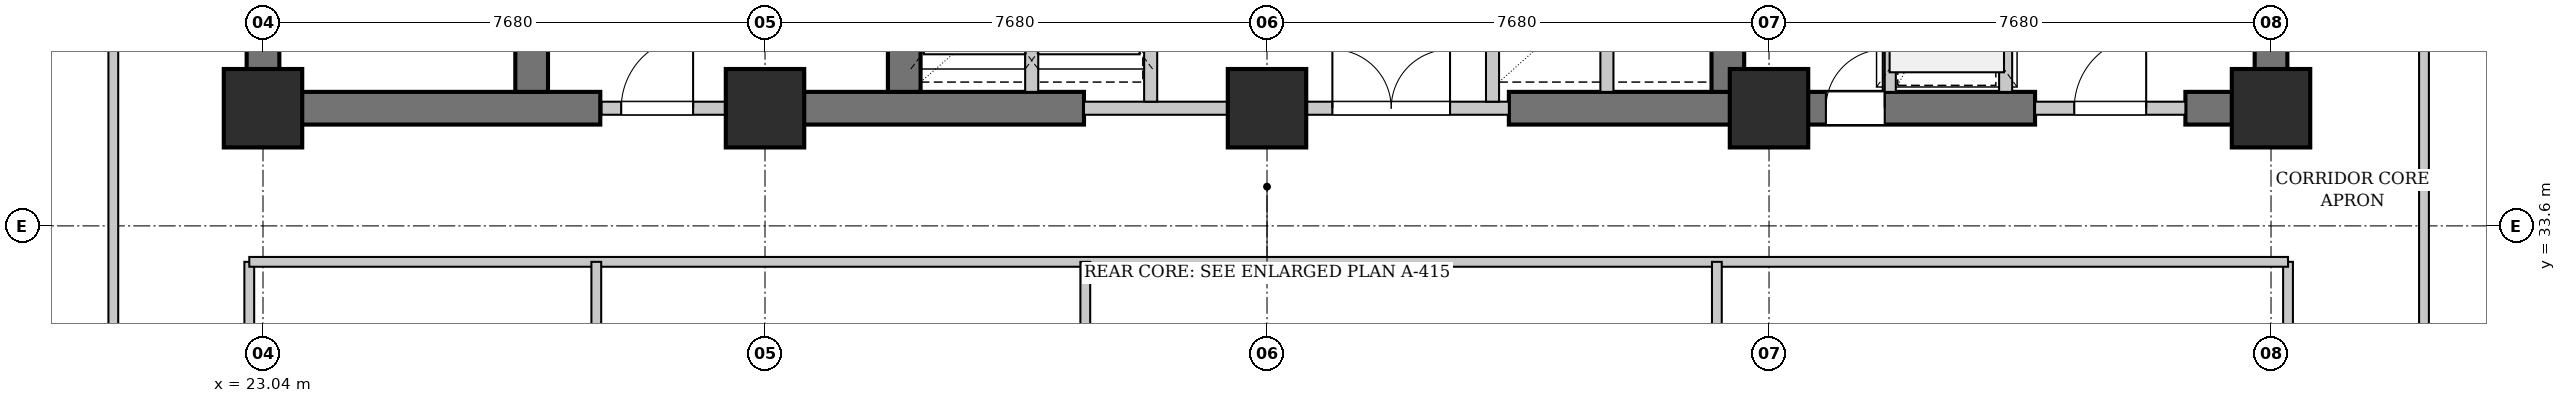
"""IFC4 building model, lengths in metres.
Left out: names, types, materials, properties, quantities, classifications, styles, units other than length and angle.
Written with IfcOpenShell. Run it as: python <this file> out.ifc"""

import sys

from ifc_helpers import new_model, si_unit, direction, frame, frame_2d, origin, origin_2d, place, context, subcontext, project, spatial, rectangle, extrude, element, fill, save


model = new_model("IFC4")
c1 = context("Model", 3, precision=1e-05, world=origin(), true_north=direction((0.0, 1.0)))
c2 = subcontext(c1, "Body", "Model", "MODEL_VIEW")
j1 = project(units=[si_unit("LENGTHUNIT", "METRE"), si_unit("PLANEANGLEUNIT", "RADIAN")], contexts=[c1])
p1 = place(None, origin())
s1 = spatial("IfcSite", under=j1, at=p1, CompositionType="ELEMENT")
p2 = place(p1, origin())
s2 = spatial("IfcBuilding", under=s1, at=p2, CompositionType="ELEMENT")
p3 = place(p2, frame((0.0, 0.0, 54.2)))
s3 = spatial("IfcBuildingStorey", under=s2, at=p3, CompositionType="ELEMENT", Elevation=54.2)
p4 = place(p3, frame((22.79, 35.4, 0.0), z_axis=(0.0, 0.0, 1.0), x_axis=(1.0, 0.0, 0.0)))
e1 = element("IfcWall", 1, at=p4, inside=s3, PredefinedType="SHEAR", context=c2, shape_type="SweptSolid", body=[
    extrude(rectangle(XDim=5.41, YDim=0.5, at=frame_2d((2.705, 0.0))), origin(), (0.0, 0.0, 1.0), 3.18),
])
p5 = place(p3, frame((30.72, 35.4, 0.0), z_axis=(0.0, 0.0, 1.0), x_axis=(1.0, 0.0, 0.0)))
e2 = element("IfcWall", 2, at=p5, inside=s3, PredefinedType="SHEAR", context=c2, shape_type="SweptSolid", body=[
    extrude(rectangle(XDim=4.88, YDim=0.5, at=frame_2d((2.44, 0.0))), origin(), (0.0, 0.0, 1.0), 3.18),
])
p6 = place(p3, frame((42.1, 35.4, 0.0), z_axis=(0.0, 0.0, 1.0), x_axis=(1.0, 0.0, 0.0)))
e3 = element("IfcWall", 3, at=p6, inside=s3, PredefinedType="SHEAR", context=c2, shape_type="SweptSolid", body=[
    extrude(rectangle(XDim=8.05, YDim=0.5, at=frame_2d((4.025, 0.0))), origin(), (0.0, 0.0, 1.0), 3.18),
])
p7 = place(p6, frame((4.85, 0.0, 0.0)))
e4 = element("IfcOpeningElement", 4, at=p7, cuts=e3, PredefinedType="OPENING", context=c2, shape_type="SweptSolid", body=[
    extrude(rectangle(XDim=0.9, YDim=2.15, at=frame_2d((0.45, 1.075))), frame((0.0, 0.26, 0.0), z_axis=(0.0, -1.0, 0.0), x_axis=(1.0, 0.0, 0.0)), (0.0, 0.0, 1.0), 0.52),
])
p8 = place(p3, frame((52.45, 35.4, 0.0), z_axis=(0.0, 0.0, 1.0), x_axis=(1.0, 0.0, 0.0)))
e5 = element("IfcWall", 5, at=p8, inside=s3, PredefinedType="SHEAR", context=c2, shape_type="SweptSolid", body=[
    extrude(rectangle(XDim=1.56, YDim=0.5, at=frame_2d((0.78, 0.0))), origin(), (0.0, 0.0, 1.0), 3.18),
])
p9 = place(p3, frame((23.04, 35.65, 0.0), z_axis=(0.0, 0.0, 1.0), x_axis=(0.0, 1.0, 0.0)))
e6 = element("IfcWall", 6, at=p9, inside=s3, PredefinedType="SHEAR", context=c2, shape_type="SweptSolid", body=[
    extrude(rectangle(XDim=10.3, YDim=0.5, at=frame_2d((5.15, 0.0))), origin(), (0.0, 0.0, 1.0), 3.18),
])
p10 = place(p3, frame((27.15, 35.65, 0.0), z_axis=(0.0, 0.0, 1.0), x_axis=(0.0, 1.0, 0.0)))
e7 = element("IfcWall", 7, at=p10, inside=s3, PredefinedType="SHEAR", context=c2, shape_type="SweptSolid", body=[
    extrude(rectangle(XDim=10.3, YDim=0.5, at=frame_2d((5.15, 0.0))), origin(), (0.0, 0.0, 1.0), 3.18),
])
p11 = place(p10, frame((0.65, 0.0, 0.0)))
e8 = element("IfcOpeningElement", 8, at=p11, cuts=e7, PredefinedType="OPENING", context=c2, shape_type="SweptSolid", body=[
    extrude(rectangle(XDim=1.1, YDim=2.15, at=frame_2d((0.55, 1.075))), frame((0.0, 0.26, 0.0), z_axis=(0.0, -1.0, 0.0), x_axis=(1.0, 0.0, 0.0)), (0.0, 0.0, 1.0), 0.52),
])
for number, where, z_axis, x_axis in (
    (9, (32.85, 35.65, 0.0), (0.0, 0.0, 1.0), (0.0, 1.0, 0.0)),
    (10, (45.45, 35.65, 0.0), (0.0, 0.0, 1.0), (0.0, 1.0, 0.0)),
    (11, (53.76, 35.65, 0.0), (0.0, 0.0, 1.0), (0.0, 1.0, 0.0)),
):
    element("IfcWall", number, at=place(p3, frame(where, z_axis=z_axis, x_axis=x_axis)), inside=s3, PredefinedType="SHEAR", context=c2, shape_type="SweptSolid", body=[
        extrude(rectangle(XDim=10.3, YDim=0.5, at=frame_2d((5.15, 0.0))), origin(), (0.0, 0.0, 1.0), 3.18),
    ])
for number, where, z_axis, x_axis in (
    (12, (23.04, 35.4, 0.0), (0.0, 0.0, 1.0), (1.0, 0.0, 0.0)),
    (13, (30.72, 35.4, 0.0), (0.0, 0.0, 1.0), (1.0, 0.0, 0.0)),
    (14, (38.4, 35.4, 0.0), (0.0, 0.0, 1.0), (1.0, 0.0, 0.0)),
    (15, (46.08, 35.4, 0.0), (0.0, 0.0, 1.0), (1.0, 0.0, 0.0)),
    (16, (53.76, 35.4, 0.0), (0.0, 0.0, 1.0), (1.0, 0.0, 0.0)),
):
    element("IfcColumn", number, at=place(p3, frame(where, z_axis=z_axis, x_axis=x_axis)), inside=s3, PredefinedType="COLUMN", context=c2, shape_type="SweptSolid", body=[
        extrude(rectangle(XDim=1.2, YDim=1.2, at=origin_2d()), origin(), (0.0, 0.0, 1.0), 3.4),
    ])
p12 = place(p3, frame((28.22, 35.4, 0.0), z_axis=(0.0, 0.0, 1.0), x_axis=(1.0, 0.0, 0.0)))
e17 = element("IfcWall", 17, at=p12, inside=s3, PredefinedType="PARTITIONING", context=c2, shape_type="SweptSolid", body=[
    extrude(rectangle(XDim=2.5, YDim=0.2, at=frame_2d((1.25, 0.0))), origin(), (0.0, 0.0, 1.0), 2.475),
])
p13 = place(p12, frame((0.3, 0.0, 0.0)))
e18 = element("IfcOpeningElement", 18, at=p13, cuts=e17, PredefinedType="OPENING", context=c2, shape_type="SweptSolid", body=[
    extrude(rectangle(XDim=1.1, YDim=2.15, at=frame_2d((0.55, 1.075))), frame((0.0, 0.11, 0.0), z_axis=(0.0, -1.0, 0.0), x_axis=(1.0, 0.0, 0.0)), (0.0, 0.0, 1.0), 0.22),
])
p14 = place(p3, frame((35.6, 35.4, 0.0), z_axis=(0.0, 0.0, 1.0), x_axis=(1.0, 0.0, 0.0)))
e19 = element("IfcWall", 19, at=p14, inside=s3, PredefinedType="PARTITIONING", context=c2, shape_type="SweptSolid", body=[
    extrude(rectangle(XDim=6.5, YDim=0.2, at=frame_2d((3.25, 0.0))), origin(), (0.0, 0.0, 1.0), 2.475),
])
p15 = place(p14, frame((3.8, 0.0, 0.0)))
e20 = element("IfcOpeningElement", 20, at=p15, cuts=e19, PredefinedType="OPENING", context=c2, shape_type="SweptSolid", body=[
    extrude(rectangle(XDim=1.8, YDim=2.3, at=frame_2d((0.9, 1.15))), frame((0.0, 0.11, 0.0), z_axis=(0.0, -1.0, 0.0), x_axis=(1.0, 0.0, 0.0)), (0.0, 0.0, 1.0), 0.22),
])
p16 = place(p3, frame((34.8, 35.65, 0.0), z_axis=(0.0, 0.0, 1.0), x_axis=(0.0, 1.0, 0.0)))
e21 = element("IfcWall", 21, at=p16, inside=s3, PredefinedType="PARTITIONING", context=c2, shape_type="SweptSolid", body=[
    extrude(rectangle(XDim=3.25, YDim=0.2, at=frame_2d((1.625, 0.0))), origin(), (0.0, 0.0, 1.0), 3.18),
])
p17 = place(p3, frame((36.62, 35.5, 0.0), z_axis=(0.0, 0.0, 1.0), x_axis=(0.0, 1.0, 0.0)))
e22 = element("IfcWall", 22, at=p17, inside=s3, PredefinedType="PARTITIONING", context=c2, shape_type="SweptSolid", body=[
    extrude(rectangle(XDim=3.4, YDim=0.2, at=frame_2d((1.7, 0.0))), origin(), (0.0, 0.0, 1.0), 3.18),
])
p18 = place(p3, frame((43.6, 35.65, 0.0), z_axis=(0.0, 0.0, 1.0), x_axis=(0.0, 1.0, 0.0)))
e23 = element("IfcWall", 23, at=p18, inside=s3, PredefinedType="PARTITIONING", context=c2, shape_type="SweptSolid", body=[
    extrude(rectangle(XDim=3.25, YDim=0.2, at=frame_2d((1.625, 0.0))), origin(), (0.0, 0.0, 1.0), 3.18),
])
p19 = place(p3, frame((41.85, 35.5, 0.0), z_axis=(0.0, 0.0, 1.0), x_axis=(0.0, 1.0, 0.0)))
e24 = element("IfcWall", 24, at=p19, inside=s3, PredefinedType="PARTITIONING", context=c2, shape_type="SweptSolid", body=[
    extrude(rectangle(XDim=3.4, YDim=0.2, at=frame_2d((1.7, 0.0))), origin(), (0.0, 0.0, 1.0), 3.18),
])
p20 = place(p3, frame((50.15, 35.4, 0.0), z_axis=(0.0, 0.0, 1.0), x_axis=(1.0, 0.0, 0.0)))
e25 = element("IfcWall", 25, at=p20, inside=s3, PredefinedType="PARTITIONING", context=c2, shape_type="SweptSolid", body=[
    extrude(rectangle(XDim=2.3, YDim=0.2, at=frame_2d((1.15, 0.0))), origin(), (0.0, 0.0, 1.0), 2.475),
])
p21 = place(p20, frame((0.6, 0.0, 0.0)))
e26 = element("IfcOpeningElement", 26, at=p21, cuts=e25, PredefinedType="OPENING", context=c2, shape_type="SweptSolid", body=[
    extrude(rectangle(XDim=1.1, YDim=2.15, at=frame_2d((0.55, 1.075))), frame((0.0, 0.11, 0.0), z_axis=(0.0, -1.0, 0.0), x_axis=(1.0, 0.0, 0.0)), (0.0, 0.0, 1.0), 0.22),
])
p22 = place(p3, frame((49.7, 35.65, 0.0), z_axis=(0.0, 0.0, 1.0), x_axis=(0.0, 1.0, 0.0)))
e27 = element("IfcWall", 27, at=p22, inside=s3, PredefinedType="PARTITIONING", context=c2, shape_type="SweptSolid", body=[
    extrude(rectangle(XDim=3.15, YDim=0.2, at=frame_2d((1.575, 0.0))), origin(), (0.0, 0.0, 1.0), 3.18),
])
p23 = place(p22, frame((0.85, 0.0, 0.0)))
e28 = element("IfcOpeningElement", 28, at=p23, cuts=e27, PredefinedType="OPENING", context=c2, shape_type="SweptSolid", body=[
    extrude(rectangle(XDim=1.2, YDim=2.2, at=frame_2d((0.6, 1.1))), frame((0.0, 0.11, 0.0), z_axis=(0.0, -1.0, 0.0), x_axis=(1.0, 0.0, 0.0)), (0.0, 0.0, 1.0), 0.22),
])
p24 = place(p3, frame((47.92, 35.65, 0.0), z_axis=(0.0, 0.0, 1.0), x_axis=(0.0, 1.0, 0.0)))
e29 = element("IfcWall", 29, at=p24, inside=s3, PredefinedType="PARTITIONING", context=c2, shape_type="SweptSolid", body=[
    extrude(rectangle(XDim=3.15, YDim=0.2, at=frame_2d((1.575, 0.0))), origin(), (0.0, 0.0, 1.0), 3.18),
])
p25 = place(p3, frame((20.75, 26.75, 0.0), z_axis=(0.0, 0.0, 1.0), x_axis=(0.0, 1.0, 0.0)))
e30 = element("IfcWall", 30, at=p25, inside=s3, PredefinedType="PARTITIONING", context=c2, shape_type="SweptSolid", body=[
    extrude(rectangle(XDim=21.77, YDim=0.15, at=frame_2d((10.885, 0.0))), origin(), (0.0, 0.0, 1.0), 3.18),
])
p26 = place(p25, frame((1.03, 0.0, 0.0)))
e31 = element("IfcOpeningElement", 31, at=p26, cuts=e30, PredefinedType="OPENING", context=c2, shape_type="SweptSolid", body=[
    extrude(rectangle(XDim=0.9, YDim=2.15, at=frame_2d((0.45, 1.075))), frame((0.0, 0.085, 0.0), z_axis=(0.0, -1.0, 0.0), x_axis=(1.0, 0.0, 0.0)), (0.0, 0.0, 1.0), 0.17),
])
p27 = place(p3, frame((56.1, 26.75, 0.0), z_axis=(0.0, 0.0, 1.0), x_axis=(0.0, 1.0, 0.0)))
e32 = element("IfcWall", 32, at=p27, inside=s3, PredefinedType="PARTITIONING", context=c2, shape_type="SweptSolid", body=[
    extrude(rectangle(XDim=21.77, YDim=0.15, at=frame_2d((10.885, 0.0))), origin(), (0.0, 0.0, 1.0), 3.18),
])
p28 = place(p27, frame((1.03, 0.0, 0.0)))
e33 = element("IfcOpeningElement", 33, at=p28, cuts=e32, PredefinedType="OPENING", context=c2, shape_type="SweptSolid", body=[
    extrude(rectangle(XDim=0.9, YDim=2.15, at=frame_2d((0.45, 1.075))), frame((0.0, 0.085, 0.0), z_axis=(0.0, -1.0, 0.0), x_axis=(1.0, 0.0, 0.0)), (0.0, 0.0, 1.0), 0.17),
])
p29 = place(p3, frame((22.83, 28.83, 0.0), z_axis=(0.0, 0.0, 1.0), x_axis=(0.0, 1.0, 0.0)))
e34 = element("IfcWall", 34, at=p29, inside=s3, PredefinedType="PARTITIONING", context=c2, shape_type="SweptSolid", body=[
    extrude(rectangle(XDim=4.22, YDim=0.15, at=frame_2d((2.11, 0.0))), origin(), (0.0, 0.0, 1.0), 2.475),
])
p30 = place(p3, frame((54.02, 28.83, 0.0), z_axis=(0.0, 0.0, 1.0), x_axis=(0.0, 1.0, 0.0)))
e35 = element("IfcWall", 35, at=p30, inside=s3, PredefinedType="PARTITIONING", context=c2, shape_type="SweptSolid", body=[
    extrude(rectangle(XDim=4.22, YDim=0.15, at=frame_2d((2.11, 0.0))), origin(), (0.0, 0.0, 1.0), 3.18),
])
p31 = place(p3, frame((22.83, 33.05, 0.0), z_axis=(0.0, 0.0, 1.0), x_axis=(1.0, 0.0, 0.0)))
e36 = element("IfcWall", 36, at=p31, inside=s3, PredefinedType="PARTITIONING", context=c2, shape_type="SweptSolid", body=[
    extrude(rectangle(XDim=31.19, YDim=0.15, at=frame_2d((15.595, 0.0))), origin(), (0.0, 0.0, 1.0), 3.18),
])
for number, where, z_axis, x_axis in (
    (37, (28.139, 28.83, 0.0), (0.0, 0.0, 1.0), (0.0, 1.0, 0.0)),
    (38, (35.62, 28.83, 0.0), (0.0, 0.0, 1.0), (0.0, 1.0, 0.0)),
    (39, (45.282, 28.83, 0.0), (0.0, 0.0, 1.0), (0.0, 1.0, 0.0)),
):
    element("IfcWall", number, at=place(p3, frame(where, z_axis=z_axis, x_axis=x_axis)), inside=s3, PredefinedType="PARTITIONING", context=c2, shape_type="SweptSolid", body=[
        extrude(rectangle(XDim=4.22, YDim=0.15, at=frame_2d((2.11, 0.0))), origin(), (0.0, 0.0, 1.0), 3.18),
    ])
p32 = place(p13, origin())
e40 = element("IfcDoor", 40, at=p32, inside=s3, OperationType="SINGLE_SWING_RIGHT", PredefinedType="DOOR", context=c2, shape_type="SweptSolid", body=[
    extrude(rectangle(XDim=1.1, YDim=2.15, at=frame_2d((0.55, 1.075))), frame((0.0, 0.025, 0.0), z_axis=(0.0, -1.0, 0.0), x_axis=(1.0, 0.0, 0.0)), (0.0, 0.0, 1.0), 0.05),
])
fill(e18, e40)
p33 = place(p15, origin())
e41 = element("IfcDoor", 41, at=p33, inside=s3, OperationType="DOUBLE_DOOR_SINGLE_SWING", PredefinedType="DOOR", context=c2, shape_type="SweptSolid", body=[
    extrude(rectangle(XDim=1.8, YDim=2.3, at=frame_2d((0.9, 1.15))), frame((0.0, 0.025, 0.0), z_axis=(0.0, -1.0, 0.0), x_axis=(1.0, 0.0, 0.0)), (0.0, 0.0, 1.0), 0.05),
])
fill(e20, e41)
p34 = place(p21, origin())
e42 = element("IfcDoor", 42, at=p34, inside=s3, OperationType="SINGLE_SWING_RIGHT", PredefinedType="DOOR", context=c2, shape_type="SweptSolid", body=[
    extrude(rectangle(XDim=1.1, YDim=2.15, at=frame_2d((0.55, 1.075))), frame((0.0, 0.025, 0.0), z_axis=(0.0, -1.0, 0.0), x_axis=(1.0, 0.0, 0.0)), (0.0, 0.0, 1.0), 0.05),
])
fill(e26, e42)
p35 = place(p7, origin())
e43 = element("IfcDoor", 43, at=p35, inside=s3, OperationType="SINGLE_SWING_RIGHT", PredefinedType="DOOR", context=c2, shape_type="SweptSolid", body=[
    extrude(rectangle(XDim=0.9, YDim=2.15, at=frame_2d((0.45, 1.075))), frame((0.0, 0.025, 0.0), z_axis=(0.0, -1.0, 0.0), x_axis=(1.0, 0.0, 0.0)), (0.0, 0.0, 1.0), 0.05),
])
fill(e4, e43)
save(model, sys.argv[1])
